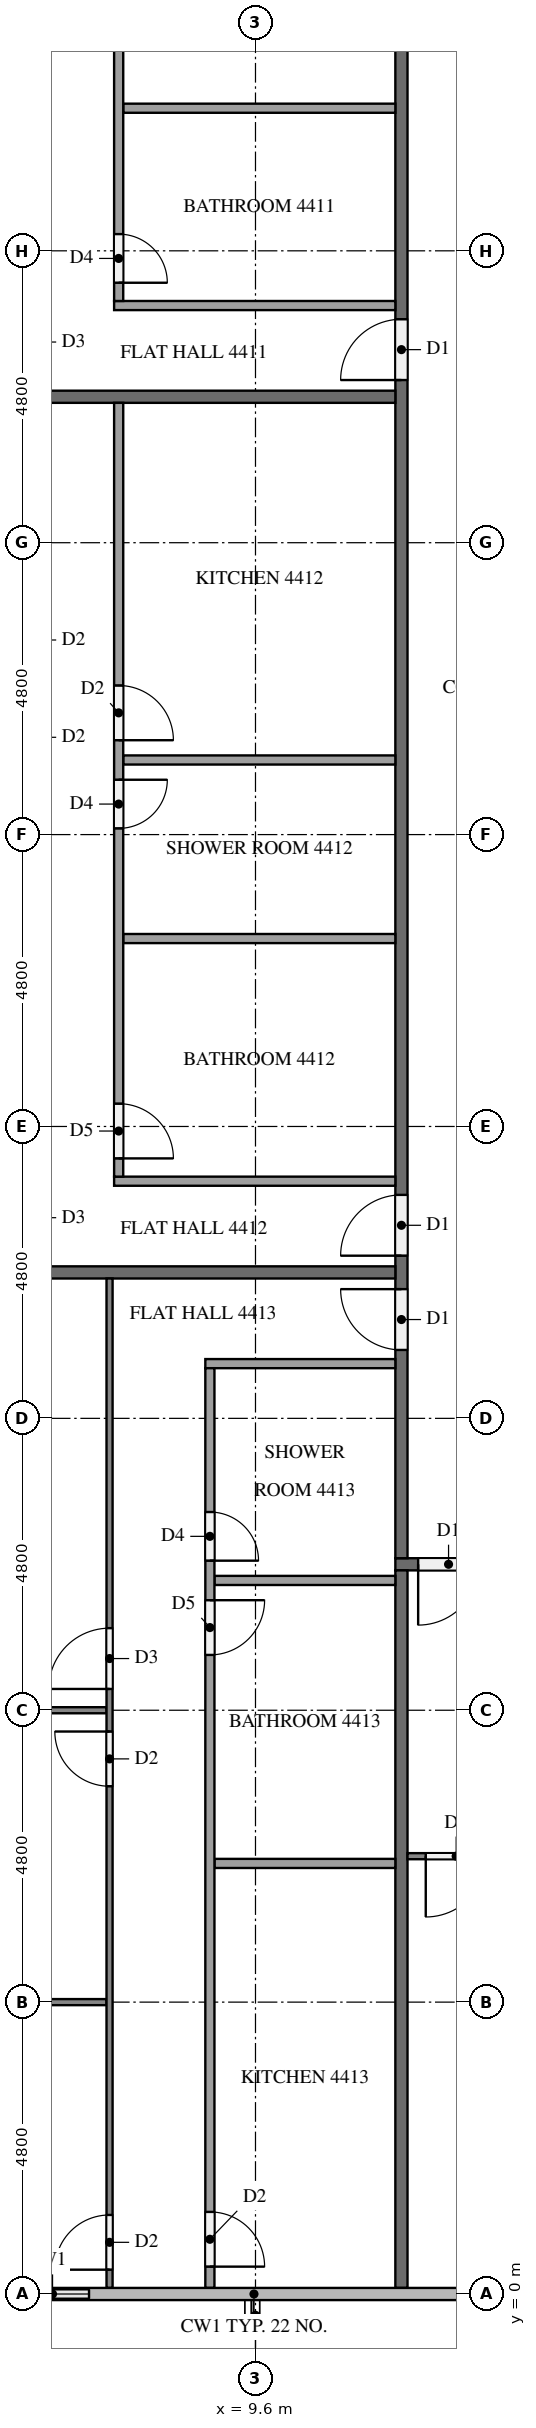
"""IFC4 building model, lengths in metres.
Left out: names, types, materials, properties, quantities, classifications, styles, units other than length and angle.
Written with IfcOpenShell. Run it as: python <this file> out.ifc"""

import sys

from ifc_helpers import new_model, si_unit, direction, frame, frame_2d, origin, place, context, subcontext, project, spatial, rectangle, extrude, element, fill, save


model = new_model("IFC4")
c1 = context("Model", 3, precision=1e-05, world=origin(), true_north=direction((0.0, 1.0)))
c2 = subcontext(c1, "Body", "Model", "MODEL_VIEW")
j1 = project(units=[si_unit("LENGTHUNIT", "METRE"), si_unit("PLANEANGLEUNIT", "RADIAN")], contexts=[c1])
p1 = place(None, origin())
s1 = spatial("IfcSite", under=j1, at=p1, CompositionType="ELEMENT")
p2 = place(p1, origin())
s2 = spatial("IfcBuilding", under=s1, at=p2, CompositionType="ELEMENT")
p3 = place(p2, frame((0.0, 0.0, 170.0)))
s3 = spatial("IfcBuildingStorey", under=s2, at=p3, CompositionType="ELEMENT", Elevation=170.0)
p4 = place(p3, frame((5.325, 0.0, 0.0), z_axis=(0.0, 0.0, 1.0), x_axis=(1.0, 0.0, 0.0)))
e1 = element("IfcWall", 1, at=p4, inside=s3, PredefinedType="SOLIDWALL", context=c2, shape_type="SweptSolid", body=[
    extrude(rectangle(XDim=1.875, YDim=0.15, at=frame_2d((0.938, 0.0))), origin(), (0.0, 0.0, 1.0), 3.1),
])
p5 = place(p4, frame((0.337, 0.0, 0.9)))
e2 = element("IfcOpeningElement", 2, at=p5, cuts=e1, PredefinedType="OPENING", context=c2, shape_type="SweptSolid", body=[
    extrude(rectangle(XDim=1.2, YDim=1.4, at=frame_2d((0.6, 0.7))), frame((0.0, 0.085, 0.0), z_axis=(0.0, -1.0, 0.0), x_axis=(1.0, 0.0, 0.0)), (0.0, 0.0, 1.0), 0.17),
])
p6 = place(p3, frame((50.5, 12.0, 0.0), z_axis=(0.0, 0.0, 1.0), x_axis=(-1.0, 0.0, 0.0)))
e3 = element("IfcWall", 3, at=p6, inside=s3, PredefinedType="PARTITIONING", context=c2, shape_type="SweptSolid", body=[
    extrude(rectangle(XDim=38.6, YDim=0.2, at=frame_2d((19.3, 0.0))), origin(), (0.0, 0.0, 1.0), 3.1),
])
p7 = place(p6, frame((37.225, 0.0, 0.0)))
e4 = element("IfcOpeningElement", 4, at=p7, cuts=e3, PredefinedType="OPENING", context=c2, shape_type="SweptSolid", body=[
    extrude(rectangle(XDim=1.0, YDim=2.1, at=frame_2d((0.5, 1.05))), frame((0.0, 0.11, 0.0), z_axis=(0.0, -1.0, 0.0), x_axis=(1.0, 0.0, 0.0)), (0.0, 0.0, 1.0), 0.22),
])
p8 = place(p6, frame((22.825, 0.0, 0.0)))
e5 = element("IfcOpeningElement", 5, at=p8, cuts=e3, PredefinedType="OPENING", context=c2, shape_type="SweptSolid", body=[
    extrude(rectangle(XDim=1.0, YDim=2.1, at=frame_2d((0.5, 1.05))), frame((0.0, 0.11, 0.0), z_axis=(0.0, -1.0, 0.0), x_axis=(1.0, 0.0, 0.0)), (0.0, 0.0, 1.0), 0.22),
])
p9 = place(p6, frame((8.425, 0.0, 0.0)))
e6 = element("IfcOpeningElement", 6, at=p9, cuts=e3, PredefinedType="OPENING", context=c2, shape_type="SweptSolid", body=[
    extrude(rectangle(XDim=1.0, YDim=2.1, at=frame_2d((0.5, 1.05))), frame((0.0, 0.11, 0.0), z_axis=(0.0, -1.0, 0.0), x_axis=(1.0, 0.0, 0.0)), (0.0, 0.0, 1.0), 0.22),
])
p10 = place(p3, frame((12.0, 12.1, 0.0), z_axis=(0.0, 0.0, 1.0), x_axis=(0.0, 1.0, 0.0)))
e7 = element("IfcWall", 7, at=p10, inside=s3, PredefinedType="PARTITIONING", context=c2, shape_type="SweptSolid", body=[
    extrude(rectangle(XDim=28.6, YDim=0.2, at=frame_2d((14.3, 0.0))), origin(), (0.0, 0.0, 1.0), 3.1),
])
p11 = place(p10, frame((19.375, 0.0, 0.0)))
e8 = element("IfcOpeningElement", 8, at=p11, cuts=e7, PredefinedType="OPENING", context=c2, shape_type="SweptSolid", body=[
    extrude(rectangle(XDim=1.0, YDim=2.1, at=frame_2d((0.5, 1.05))), frame((0.0, 0.11, 0.0), z_axis=(0.0, -1.0, 0.0), x_axis=(1.0, 0.0, 0.0)), (0.0, 0.0, 1.0), 0.22),
])
p12 = place(p10, frame((4.975, 0.0, 0.0)))
e9 = element("IfcOpeningElement", 9, at=p12, cuts=e7, PredefinedType="OPENING", context=c2, shape_type="SweptSolid", body=[
    extrude(rectangle(XDim=1.0, YDim=2.1, at=frame_2d((0.5, 1.05))), frame((0.0, 0.11, 0.0), z_axis=(0.0, -1.0, 0.0), x_axis=(1.0, 0.0, 0.0)), (0.0, 0.0, 1.0), 0.22),
])
p13 = place(p10, frame((3.425, 0.0, 0.0)))
e10 = element("IfcOpeningElement", 10, at=p13, cuts=e7, PredefinedType="OPENING", context=c2, shape_type="SweptSolid", body=[
    extrude(rectangle(XDim=1.0, YDim=2.1, at=frame_2d((0.5, 1.05))), frame((0.0, 0.11, 0.0), z_axis=(0.0, -1.0, 0.0), x_axis=(1.0, 0.0, 0.0)), (0.0, 0.0, 1.0), 0.22),
])
for number, where, z_axis, x_axis in (
    (11, (12.0, 0.1, 0.0), (0.0, 0.0, 1.0), (0.0, 1.0, 0.0)),
    (12, (0.1, 31.2, 0.0), (0.0, 0.0, 1.0), (1.0, 0.0, 0.0)),
    (13, (0.1, 16.8, 0.0), (0.0, 0.0, 1.0), (1.0, 0.0, 0.0)),
):
    element("IfcWall", number, at=place(p3, frame(where, z_axis=z_axis, x_axis=x_axis)), inside=s3, PredefinedType="PARTITIONING", context=c2, shape_type="SweptSolid", body=[
        extrude(rectangle(XDim=11.8, YDim=0.2, at=frame_2d((5.9, 0.0))), origin(), (0.0, 0.0, 1.0), 3.1),
    ])
p14 = place(p3, frame((26.3, 7.2, 0.0), z_axis=(0.0, 0.0, 1.0), x_axis=(-1.0, 0.0, 0.0)))
e14 = element("IfcWall", 14, at=p14, inside=s3, PredefinedType="PARTITIONING", context=c2, shape_type="SweptSolid", body=[
    extrude(rectangle(XDim=14.2, YDim=0.1, at=frame_2d((7.1, 0.0))), origin(), (0.0, 0.0, 1.0), 3.1),
])
p15 = place(p14, frame((12.9, 0.0, 0.0)))
e15 = element("IfcOpeningElement", 15, at=p15, cuts=e14, PredefinedType="OPENING", context=c2, shape_type="SweptSolid", body=[
    extrude(rectangle(XDim=1.0, YDim=2.1, at=frame_2d((0.5, 1.05))), frame((0.0, 0.06, 0.0), z_axis=(0.0, -1.0, 0.0), x_axis=(1.0, 0.0, 0.0)), (0.0, 0.0, 1.0), 0.12),
])
p16 = place(p14, frame((5.05, 0.0, 0.0)))
e16 = element("IfcOpeningElement", 16, at=p16, cuts=e14, PredefinedType="OPENING", context=c2, shape_type="SweptSolid", body=[
    extrude(rectangle(XDim=0.9, YDim=2.1, at=frame_2d((0.45, 1.05))), frame((0.0, 0.06, 0.0), z_axis=(0.0, -1.0, 0.0), x_axis=(1.0, 0.0, 0.0)), (0.0, 0.0, 1.0), 0.12),
])
p17 = place(p14, frame((3.45, 0.0, 0.0)))
e17 = element("IfcOpeningElement", 17, at=p17, cuts=e14, PredefinedType="OPENING", context=c2, shape_type="SweptSolid", body=[
    extrude(rectangle(XDim=0.9, YDim=2.1, at=frame_2d((0.45, 1.05))), frame((0.0, 0.06, 0.0), z_axis=(0.0, -1.0, 0.0), x_axis=(1.0, 0.0, 0.0)), (0.0, 0.0, 1.0), 0.12),
])
p18 = place(p3, frame((11.9, 35.945, 0.0), z_axis=(0.0, 0.0, 1.0), x_axis=(-1.0, 0.0, 0.0)))
e18 = element("IfcWall", 18, at=p18, inside=s3, PredefinedType="PARTITIONING", context=c2, shape_type="SweptSolid", body=[
    extrude(rectangle(XDim=4.475, YDim=0.15, at=frame_2d((2.237, 0.0))), origin(), (0.0, 0.0, 1.0), 3.1),
])
p19 = place(p3, frame((11.9, 32.7, 0.0), z_axis=(0.0, 0.0, 1.0), x_axis=(-1.0, 0.0, 0.0)))
e19 = element("IfcWall", 19, at=p19, inside=s3, PredefinedType="PARTITIONING", context=c2, shape_type="SweptSolid", body=[
    extrude(rectangle(XDim=4.625, YDim=0.15, at=frame_2d((2.312, 0.0))), origin(), (0.0, 0.0, 1.0), 3.1),
])
p20 = place(p3, frame((7.35, 40.7, 0.0), z_axis=(0.0, 0.0, 1.0), x_axis=(0.0, -1.0, 0.0)))
e20 = element("IfcWall", 20, at=p20, inside=s3, PredefinedType="PARTITIONING", context=c2, shape_type="SweptSolid", body=[
    extrude(rectangle(XDim=7.925, YDim=0.15, at=frame_2d((3.962, 0.0))), origin(), (0.0, 0.0, 1.0), 3.1),
])
p21 = place(p20, frame((6.825, 0.0, 0.0)))
e21 = element("IfcOpeningElement", 21, at=p21, cuts=e20, PredefinedType="OPENING", context=c2, shape_type="SweptSolid", body=[
    extrude(rectangle(XDim=0.8, YDim=2.1, at=frame_2d((0.4, 1.05))), frame((0.0, 0.085, 0.0), z_axis=(0.0, -1.0, 0.0), x_axis=(1.0, 0.0, 0.0)), (0.0, 0.0, 1.0), 0.17),
])
p22 = place(p20, frame((0.35, 0.0, 0.0)))
e22 = element("IfcOpeningElement", 22, at=p22, cuts=e20, PredefinedType="OPENING", context=c2, shape_type="SweptSolid", body=[
    extrude(rectangle(XDim=0.9, YDim=2.1, at=frame_2d((0.45, 1.05))), frame((0.0, 0.085, 0.0), z_axis=(0.0, -1.0, 0.0), x_axis=(1.0, 0.0, 0.0)), (0.0, 0.0, 1.0), 0.17),
])
for number, where, z_axis, x_axis in (
    (23, (11.9, 22.29, 0.0), (0.0, 0.0, 1.0), (-1.0, 0.0, 0.0)),
    (24, (11.9, 25.227, 0.0), (0.0, 0.0, 1.0), (-1.0, 0.0, 0.0)),
):
    element("IfcWall", number, at=place(p3, frame(where, z_axis=z_axis, x_axis=x_axis)), inside=s3, PredefinedType="PARTITIONING", context=c2, shape_type="SweptSolid", body=[
        extrude(rectangle(XDim=4.475, YDim=0.15, at=frame_2d((2.237, 0.0))), origin(), (0.0, 0.0, 1.0), 3.1),
    ])
p23 = place(p3, frame((11.9, 18.3, 0.0), z_axis=(0.0, 0.0, 1.0), x_axis=(-1.0, 0.0, 0.0)))
e25 = element("IfcWall", 25, at=p23, inside=s3, PredefinedType="PARTITIONING", context=c2, shape_type="SweptSolid", body=[
    extrude(rectangle(XDim=4.625, YDim=0.15, at=frame_2d((2.312, 0.0))), origin(), (0.0, 0.0, 1.0), 3.1),
])
p24 = place(p3, frame((7.35, 31.1, 0.0), z_axis=(0.0, 0.0, 1.0), x_axis=(0.0, -1.0, 0.0)))
e26 = element("IfcWall", 26, at=p24, inside=s3, PredefinedType="PARTITIONING", context=c2, shape_type="SweptSolid", body=[
    extrude(rectangle(XDim=12.725, YDim=0.15, at=frame_2d((6.363, 0.0))), origin(), (0.0, 0.0, 1.0), 3.1),
])
p25 = place(p24, frame((11.525, 0.0, 0.0)))
e27 = element("IfcOpeningElement", 27, at=p25, cuts=e26, PredefinedType="OPENING", context=c2, shape_type="SweptSolid", body=[
    extrude(rectangle(XDim=0.9, YDim=2.1, at=frame_2d((0.45, 1.05))), frame((0.0, 0.085, 0.0), z_axis=(0.0, -1.0, 0.0), x_axis=(1.0, 0.0, 0.0)), (0.0, 0.0, 1.0), 0.17),
])
p26 = place(p24, frame((6.198, 0.0, 0.0)))
e28 = element("IfcOpeningElement", 28, at=p26, cuts=e26, PredefinedType="OPENING", context=c2, shape_type="SweptSolid", body=[
    extrude(rectangle(XDim=0.8, YDim=2.1, at=frame_2d((0.4, 1.05))), frame((0.0, 0.085, 0.0), z_axis=(0.0, -1.0, 0.0), x_axis=(1.0, 0.0, 0.0)), (0.0, 0.0, 1.0), 0.17),
])
p27 = place(p24, frame((4.648, 0.0, 0.0)))
e29 = element("IfcOpeningElement", 29, at=p27, cuts=e26, PredefinedType="OPENING", context=c2, shape_type="SweptSolid", body=[
    extrude(rectangle(XDim=0.9, YDim=2.1, at=frame_2d((0.45, 1.05))), frame((0.0, 0.085, 0.0), z_axis=(0.0, -1.0, 0.0), x_axis=(1.0, 0.0, 0.0)), (0.0, 0.0, 1.0), 0.17),
])
p28 = place(p3, frame((7.15, 9.6, 0.0), z_axis=(0.0, 0.0, 1.0), x_axis=(-1.0, 0.0, 0.0)))
e30 = element("IfcWall", 30, at=p28, inside=s3, PredefinedType="PARTITIONING", context=c2, shape_type="SweptSolid", body=[
    extrude(rectangle(XDim=7.05, YDim=0.1, at=frame_2d((3.525, 0.0))), origin(), (0.0, 0.0, 1.0), 3.1),
])
p29 = place(p3, frame((7.15, 4.8, 0.0), z_axis=(0.0, 0.0, 1.0), x_axis=(-1.0, 0.0, 0.0)))
e31 = element("IfcWall", 31, at=p29, inside=s3, PredefinedType="PARTITIONING", context=c2, shape_type="SweptSolid", body=[
    extrude(rectangle(XDim=6.625, YDim=0.1, at=frame_2d((3.312, 0.0))), origin(), (0.0, 0.0, 1.0), 3.1),
])
p30 = place(p3, frame((7.2, 0.1, 0.0), z_axis=(0.0, 0.0, 1.0), x_axis=(0.0, 1.0, 0.0)))
e32 = element("IfcWall", 32, at=p30, inside=s3, PredefinedType="PARTITIONING", context=c2, shape_type="SweptSolid", body=[
    extrude(rectangle(XDim=16.6, YDim=0.1, at=frame_2d((8.3, 0.0))), origin(), (0.0, 0.0, 1.0), 3.1),
])
p31 = place(p30, frame((9.85, 0.0, 0.0)))
e33 = element("IfcOpeningElement", 33, at=p31, cuts=e32, PredefinedType="OPENING", context=c2, shape_type="SweptSolid", body=[
    extrude(rectangle(XDim=1.0, YDim=2.1, at=frame_2d((0.5, 1.05))), frame((0.0, 0.06, 0.0), z_axis=(0.0, -1.0, 0.0), x_axis=(1.0, 0.0, 0.0)), (0.0, 0.0, 1.0), 0.12),
])
p32 = place(p30, frame((8.25, 0.0, 0.0)))
e34 = element("IfcOpeningElement", 34, at=p32, cuts=e32, PredefinedType="OPENING", context=c2, shape_type="SweptSolid", body=[
    extrude(rectangle(XDim=0.9, YDim=2.1, at=frame_2d((0.45, 1.05))), frame((0.0, 0.06, 0.0), z_axis=(0.0, -1.0, 0.0), x_axis=(1.0, 0.0, 0.0)), (0.0, 0.0, 1.0), 0.12),
])
p33 = place(p30, frame((0.3, 0.0, 0.0)))
e35 = element("IfcOpeningElement", 35, at=p33, cuts=e32, PredefinedType="OPENING", context=c2, shape_type="SweptSolid", body=[
    extrude(rectangle(XDim=0.9, YDim=2.1, at=frame_2d((0.45, 1.05))), frame((0.0, 0.06, 0.0), z_axis=(0.0, -1.0, 0.0), x_axis=(1.0, 0.0, 0.0)), (0.0, 0.0, 1.0), 0.12),
])
for number, where, z_axis, x_axis in (
    (36, (11.9, 11.735, 0.0), (0.0, 0.0, 1.0), (-1.0, 0.0, 0.0)),
    (37, (11.9, 7.081, 0.0), (0.0, 0.0, 1.0), (-1.0, 0.0, 0.0)),
):
    element("IfcWall", number, at=place(p3, frame(where, z_axis=z_axis, x_axis=x_axis)), inside=s3, PredefinedType="PARTITIONING", context=c2, shape_type="SweptSolid", body=[
        extrude(rectangle(XDim=2.975, YDim=0.15, at=frame_2d((1.487, 0.0))), origin(), (0.0, 0.0, 1.0), 3.1),
    ])
p34 = place(p3, frame((11.9, 15.3, 0.0), z_axis=(0.0, 0.0, 1.0), x_axis=(-1.0, 0.0, 0.0)))
e38 = element("IfcWall", 38, at=p34, inside=s3, PredefinedType="PARTITIONING", context=c2, shape_type="SweptSolid", body=[
    extrude(rectangle(XDim=3.125, YDim=0.15, at=frame_2d((1.562, 0.0))), origin(), (0.0, 0.0, 1.0), 3.1),
])
p35 = place(p3, frame((8.85, 15.225, 0.0), z_axis=(0.0, 0.0, 1.0), x_axis=(0.0, -1.0, 0.0)))
e39 = element("IfcWall", 39, at=p35, inside=s3, PredefinedType="PARTITIONING", context=c2, shape_type="SweptSolid", body=[
    extrude(rectangle(XDim=15.125, YDim=0.15, at=frame_2d((7.562, 0.0))), origin(), (0.0, 0.0, 1.0), 3.1),
])
p36 = place(p35, frame((2.365, 0.0, 0.0)))
e40 = element("IfcOpeningElement", 40, at=p36, cuts=e39, PredefinedType="OPENING", context=c2, shape_type="SweptSolid", body=[
    extrude(rectangle(XDim=0.8, YDim=2.1, at=frame_2d((0.4, 1.05))), frame((0.0, 0.085, 0.0), z_axis=(0.0, -1.0, 0.0), x_axis=(1.0, 0.0, 0.0)), (0.0, 0.0, 1.0), 0.17),
])
p37 = place(p35, frame((3.815, 0.0, 0.0)))
e41 = element("IfcOpeningElement", 41, at=p37, cuts=e39, PredefinedType="OPENING", context=c2, shape_type="SweptSolid", body=[
    extrude(rectangle(XDim=0.9, YDim=2.1, at=frame_2d((0.45, 1.05))), frame((0.0, 0.085, 0.0), z_axis=(0.0, -1.0, 0.0), x_axis=(1.0, 0.0, 0.0)), (0.0, 0.0, 1.0), 0.17),
])
p38 = place(p35, frame((13.875, 0.0, 0.0)))
e42 = element("IfcOpeningElement", 42, at=p38, cuts=e39, PredefinedType="OPENING", context=c2, shape_type="SweptSolid", body=[
    extrude(rectangle(XDim=0.9, YDim=2.1, at=frame_2d((0.45, 1.05))), frame((0.0, 0.085, 0.0), z_axis=(0.0, -1.0, 0.0), x_axis=(1.0, 0.0, 0.0)), (0.0, 0.0, 1.0), 0.17),
])
p39 = place(p5, origin())
e43 = element("IfcWindow", 43, at=p39, inside=s3, PartitioningType="SINGLE_PANEL", PredefinedType="WINDOW", context=c2, shape_type="SweptSolid", body=[
    extrude(rectangle(XDim=1.2, YDim=1.4, at=frame_2d((0.6, 0.7))), frame((0.0, 0.03, 0.0), z_axis=(0.0, -1.0, 0.0), x_axis=(1.0, 0.0, 0.0)), (0.0, 0.0, 1.0), 0.06),
])
fill(e2, e43)
p40 = place(p7, origin())
e44 = element("IfcDoor", 44, at=p40, inside=s3, OperationType="SINGLE_SWING_RIGHT", PredefinedType="DOOR", context=c2, shape_type="SweptSolid", body=[
    extrude(rectangle(XDim=1.0, YDim=2.1, at=frame_2d((0.5, 1.05))), frame((0.0, 0.025, 0.0), z_axis=(0.0, -1.0, 0.0), x_axis=(1.0, 0.0, 0.0)), (0.0, 0.0, 1.0), 0.05),
])
fill(e4, e44)
p41 = place(p11, origin())
e45 = element("IfcDoor", 45, at=p41, inside=s3, OperationType="SINGLE_SWING_LEFT", PredefinedType="DOOR", context=c2, shape_type="SweptSolid", body=[
    extrude(rectangle(XDim=1.0, YDim=2.1, at=frame_2d((0.5, 1.05))), frame((0.0, 0.025, 0.0), z_axis=(0.0, -1.0, 0.0), x_axis=(1.0, 0.0, 0.0)), (0.0, 0.0, 1.0), 0.05),
])
fill(e8, e45)
p42 = place(p12, origin())
e46 = element("IfcDoor", 46, at=p42, inside=s3, OperationType="SINGLE_SWING_LEFT", PredefinedType="DOOR", context=c2, shape_type="SweptSolid", body=[
    extrude(rectangle(XDim=1.0, YDim=2.1, at=frame_2d((0.5, 1.05))), frame((0.0, 0.025, 0.0), z_axis=(0.0, -1.0, 0.0), x_axis=(1.0, 0.0, 0.0)), (0.0, 0.0, 1.0), 0.05),
])
fill(e9, e46)
p43 = place(p13, origin())
e47 = element("IfcDoor", 47, at=p43, inside=s3, OperationType="SINGLE_SWING_RIGHT", PredefinedType="DOOR", context=c2, shape_type="SweptSolid", body=[
    extrude(rectangle(XDim=1.0, YDim=2.1, at=frame_2d((0.5, 1.05))), frame((0.0, 0.025, 0.0), z_axis=(0.0, -1.0, 0.0), x_axis=(1.0, 0.0, 0.0)), (0.0, 0.0, 1.0), 0.05),
])
fill(e10, e47)
p44 = place(p15, origin())
e48 = element("IfcDoor", 48, at=p44, inside=s3, OperationType="SINGLE_SWING_RIGHT", PredefinedType="DOOR", context=c2, shape_type="SweptSolid", body=[
    extrude(rectangle(XDim=1.0, YDim=2.1, at=frame_2d((0.5, 1.05))), frame((0.0, 0.025, 0.0), z_axis=(0.0, -1.0, 0.0), x_axis=(1.0, 0.0, 0.0)), (0.0, 0.0, 1.0), 0.05),
])
fill(e15, e48)
p45 = place(p21, origin())
e49 = element("IfcDoor", 49, at=p45, inside=s3, OperationType="SINGLE_SWING_RIGHT", PredefinedType="DOOR", context=c2, shape_type="SweptSolid", body=[
    extrude(rectangle(XDim=0.8, YDim=2.1, at=frame_2d((0.4, 1.05))), frame((0.0, 0.025, 0.0), z_axis=(0.0, -1.0, 0.0), x_axis=(1.0, 0.0, 0.0)), (0.0, 0.0, 1.0), 0.05),
])
fill(e21, e49)
p46 = place(p25, origin())
e50 = element("IfcDoor", 50, at=p46, inside=s3, OperationType="SINGLE_SWING_RIGHT", PredefinedType="DOOR", context=c2, shape_type="SweptSolid", body=[
    extrude(rectangle(XDim=0.9, YDim=2.1, at=frame_2d((0.45, 1.05))), frame((0.0, 0.025, 0.0), z_axis=(0.0, -1.0, 0.0), x_axis=(1.0, 0.0, 0.0)), (0.0, 0.0, 1.0), 0.05),
])
fill(e27, e50)
p47 = place(p26, origin())
e51 = element("IfcDoor", 51, at=p47, inside=s3, OperationType="SINGLE_SWING_LEFT", PredefinedType="DOOR", context=c2, shape_type="SweptSolid", body=[
    extrude(rectangle(XDim=0.8, YDim=2.1, at=frame_2d((0.4, 1.05))), frame((0.0, 0.025, 0.0), z_axis=(0.0, -1.0, 0.0), x_axis=(1.0, 0.0, 0.0)), (0.0, 0.0, 1.0), 0.05),
])
fill(e28, e51)
p48 = place(p27, origin())
e52 = element("IfcDoor", 52, at=p48, inside=s3, OperationType="SINGLE_SWING_RIGHT", PredefinedType="DOOR", context=c2, shape_type="SweptSolid", body=[
    extrude(rectangle(XDim=0.9, YDim=2.1, at=frame_2d((0.45, 1.05))), frame((0.0, 0.025, 0.0), z_axis=(0.0, -1.0, 0.0), x_axis=(1.0, 0.0, 0.0)), (0.0, 0.0, 1.0), 0.05),
])
fill(e29, e52)
p49 = place(p31, origin())
e53 = element("IfcDoor", 53, at=p49, inside=s3, OperationType="SINGLE_SWING_LEFT", PredefinedType="DOOR", context=c2, shape_type="SweptSolid", body=[
    extrude(rectangle(XDim=1.0, YDim=2.1, at=frame_2d((0.5, 1.05))), frame((0.0, 0.025, 0.0), z_axis=(0.0, -1.0, 0.0), x_axis=(1.0, 0.0, 0.0)), (0.0, 0.0, 1.0), 0.05),
])
fill(e33, e53)
p50 = place(p32, origin())
e54 = element("IfcDoor", 54, at=p50, inside=s3, OperationType="SINGLE_SWING_RIGHT", PredefinedType="DOOR", context=c2, shape_type="SweptSolid", body=[
    extrude(rectangle(XDim=0.9, YDim=2.1, at=frame_2d((0.45, 1.05))), frame((0.0, 0.025, 0.0), z_axis=(0.0, -1.0, 0.0), x_axis=(1.0, 0.0, 0.0)), (0.0, 0.0, 1.0), 0.05),
])
fill(e34, e54)
p51 = place(p33, origin())
e55 = element("IfcDoor", 55, at=p51, inside=s3, OperationType="SINGLE_SWING_LEFT", PredefinedType="DOOR", context=c2, shape_type="SweptSolid", body=[
    extrude(rectangle(XDim=0.9, YDim=2.1, at=frame_2d((0.45, 1.05))), frame((0.0, 0.025, 0.0), z_axis=(0.0, -1.0, 0.0), x_axis=(1.0, 0.0, 0.0)), (0.0, 0.0, 1.0), 0.05),
])
fill(e35, e55)
p52 = place(p36, origin())
e56 = element("IfcDoor", 56, at=p52, inside=s3, OperationType="SINGLE_SWING_RIGHT", PredefinedType="DOOR", context=c2, shape_type="SweptSolid", body=[
    extrude(rectangle(XDim=0.8, YDim=2.1, at=frame_2d((0.4, 1.05))), frame((0.0, 0.025, 0.0), z_axis=(0.0, -1.0, 0.0), x_axis=(1.0, 0.0, 0.0)), (0.0, 0.0, 1.0), 0.05),
])
fill(e40, e56)
p53 = place(p37, origin())
e57 = element("IfcDoor", 57, at=p53, inside=s3, OperationType="SINGLE_SWING_LEFT", PredefinedType="DOOR", context=c2, shape_type="SweptSolid", body=[
    extrude(rectangle(XDim=0.9, YDim=2.1, at=frame_2d((0.45, 1.05))), frame((0.0, 0.025, 0.0), z_axis=(0.0, -1.0, 0.0), x_axis=(1.0, 0.0, 0.0)), (0.0, 0.0, 1.0), 0.05),
])
fill(e41, e57)
p54 = place(p38, origin())
e58 = element("IfcDoor", 58, at=p54, inside=s3, OperationType="SINGLE_SWING_RIGHT", PredefinedType="DOOR", context=c2, shape_type="SweptSolid", body=[
    extrude(rectangle(XDim=0.9, YDim=2.1, at=frame_2d((0.45, 1.05))), frame((0.0, 0.025, 0.0), z_axis=(0.0, -1.0, 0.0), x_axis=(1.0, 0.0, 0.0)), (0.0, 0.0, 1.0), 0.05),
])
fill(e42, e58)
save(model, sys.argv[1])
